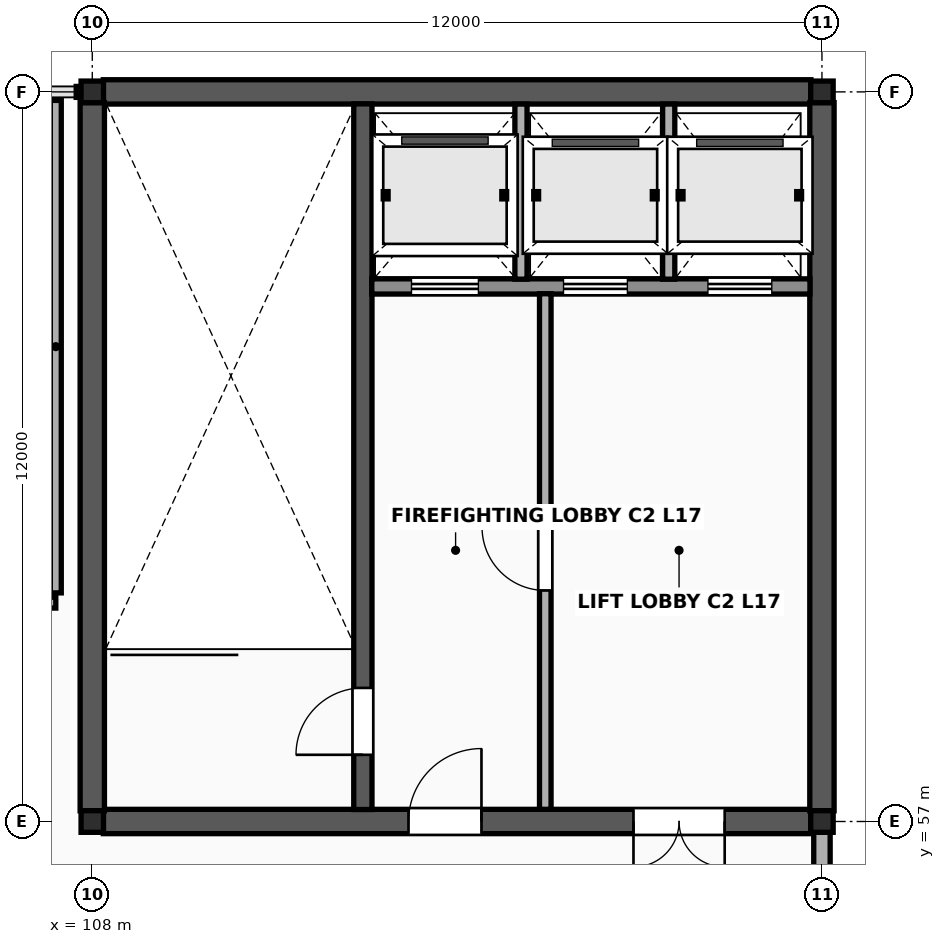
"""IFC4 building model, lengths in metres.
Left out: names, types, materials, properties, quantities, classifications, styles, units other than length and angle.
Written with IfcOpenShell. Run it as: python <this file> out.ifc"""

import sys

from ifc_helpers import new_model, si_unit, direction, frame, frame_2d, origin, origin_2d, place, context, subcontext, project, spatial, rectangle, i_section, extrude, element, fill, save


model = new_model("IFC4")
c1 = context("Model", 3, precision=1e-05, world=origin(), true_north=direction((0.0, 1.0)))
c2 = subcontext(c1, "Body", "Model", "MODEL_VIEW")
j1 = project(units=[si_unit("LENGTHUNIT", "METRE"), si_unit("PLANEANGLEUNIT", "RADIAN")], contexts=[c1])
p1 = place(None, origin())
s1 = spatial("IfcSite", under=j1, at=p1, CompositionType="ELEMENT")
p2 = place(p1, origin())
s2 = spatial("IfcBuilding", under=s1, at=p2, CompositionType="ELEMENT")
p3 = place(p2, frame((0.0, 0.0, 69.6)))
s3 = spatial("IfcBuildingStorey", under=s2, at=p3, CompositionType="ELEMENT", Elevation=69.6)
for number, where, z_axis, x_axis in (
    (1, (108.0, 57.0, 0.0), (0.0, 0.0, 1.0), (1.0, 0.0, 0.0)),
    (2, (108.0, 69.0, 0.0), (0.0, 0.0, 1.0), (1.0, 0.0, 0.0)),
    (3, (120.0, 57.0, 0.0), (0.0, 0.0, 1.0), (1.0, 0.0, 0.0)),
    (4, (120.0, 69.0, 0.0), (0.0, 0.0, 1.0), (1.0, 0.0, 0.0)),
):
    element("IfcColumn", number, at=place(p3, frame(where, z_axis=z_axis, x_axis=x_axis)), inside=s3, PredefinedType="COLUMN", context=c2, shape_type="SweptSolid", body=[
        extrude(i_section(OverallWidth=0.369, OverallDepth=0.356, WebThickness=0.011, FlangeThickness=0.018, FilletRadius=0.018, at=origin_2d()), origin(), (0.0, 0.0, 1.0), 4.6),
    ])
p4 = place(p3, frame((108.181, 57.0, 0.0), z_axis=(0.0, 0.0, 1.0), x_axis=(1.0, 0.0, 0.0)))
e5 = element("IfcWall", 5, at=p4, inside=s3, PredefinedType="SHEAR", context=c2, shape_type="SweptSolid", body=[
    extrude(rectangle(XDim=11.637, YDim=0.4, at=frame_2d((5.819, 0.0))), origin(), (0.0, 0.0, 1.0), 4.383),
])
p5 = place(p4, frame((5.019, 0.0, 0.0)))
e6 = element("IfcOpeningElement", 6, at=p5, cuts=e5, PredefinedType="OPENING", context=c2, shape_type="SweptSolid", body=[
    extrude(rectangle(XDim=1.2, YDim=2.2, at=frame_2d((0.6, 1.1))), frame((0.0, 0.215, 0.0), z_axis=(0.0, -1.0, 0.0), x_axis=(1.0, 0.0, 0.0)), (0.0, 0.0, 1.0), 0.43),
])
p6 = place(p4, frame((8.719, 0.0, 0.0)))
e7 = element("IfcOpeningElement", 7, at=p6, cuts=e5, PredefinedType="OPENING", context=c2, shape_type="SweptSolid", body=[
    extrude(rectangle(XDim=1.5, YDim=2.25, at=frame_2d((0.75, 1.125))), frame((0.0, 0.215, 0.0), z_axis=(0.0, -1.0, 0.0), x_axis=(1.0, 0.0, 0.0)), (0.0, 0.0, 1.0), 0.43),
])
p7 = place(p3, frame((108.181, 69.0, 0.0), z_axis=(0.0, 0.0, 1.0), x_axis=(1.0, 0.0, 0.0)))
e8 = element("IfcWall", 8, at=p7, inside=s3, PredefinedType="SHEAR", context=c2, shape_type="SweptSolid", body=[
    extrude(rectangle(XDim=11.637, YDim=0.4, at=frame_2d((5.819, 0.0))), origin(), (0.0, 0.0, 1.0), 4.383),
])
for number, where, z_axis, x_axis in (
    (9, (108.0, 57.175, 0.0), (0.0, 0.0, 1.0), (0.0, 1.0, 0.0)),
    (10, (120.0, 57.175, 0.0), (0.0, 0.0, 1.0), (0.0, 1.0, 0.0)),
):
    element("IfcWall", number, at=place(p3, frame(where, z_axis=z_axis, x_axis=x_axis)), inside=s3, PredefinedType="SHEAR", context=c2, shape_type="SweptSolid", body=[
        extrude(rectangle(XDim=11.65, YDim=0.4, at=frame_2d((5.825, 0.0))), origin(), (0.0, 0.0, 1.0), 4.383),
    ])
p8 = place(p3, frame((112.45, 57.197, 0.0), z_axis=(0.0, 0.0, 1.0), x_axis=(0.0, 1.0, 0.0)))
e11 = element("IfcWall", 11, at=p8, inside=s3, PredefinedType="SHEAR", context=c2, shape_type="SweptSolid", body=[
    extrude(rectangle(XDim=11.606, YDim=0.3, at=frame_2d((5.803, 0.0))), origin(), (0.0, 0.0, 1.0), 4.383),
])
p9 = place(p8, frame((0.9, 0.0, 0.0)))
e12 = element("IfcOpeningElement", 12, at=p9, cuts=e11, PredefinedType="OPENING", context=c2, shape_type="SweptSolid", body=[
    extrude(rectangle(XDim=1.1, YDim=2.2, at=frame_2d((0.55, 1.1))), frame((0.0, 0.165, 0.0), z_axis=(0.0, -1.0, 0.0), x_axis=(1.0, 0.0, 0.0)), (0.0, 0.0, 1.0), 0.33),
])
p10 = place(p3, frame((112.597, 65.8, 0.0), z_axis=(0.0, 0.0, 1.0), x_axis=(1.0, 0.0, 0.0)))
e13 = element("IfcWall", 13, at=p10, inside=s3, PredefinedType="SOLIDWALL", context=c2, shape_type="SweptSolid", body=[
    extrude(rectangle(XDim=7.206, YDim=0.25, at=frame_2d((3.603, 0.0))), origin(), (0.0, 0.0, 1.0), 4.383),
])
p11 = place(p10, frame((0.653, 0.0, 0.0)))
e14 = element("IfcOpeningElement", 14, at=p11, cuts=e13, PredefinedType="OPENING", context=c2, shape_type="SweptSolid", body=[
    extrude(rectangle(XDim=1.1, YDim=2.24, at=frame_2d((0.55, 1.12))), frame((0.0, 0.14, 0.0), z_axis=(0.0, -1.0, 0.0), x_axis=(1.0, 0.0, 0.0)), (0.0, 0.0, 1.0), 0.28),
])
p12 = place(p10, frame((3.153, 0.0, 0.0)))
e15 = element("IfcOpeningElement", 15, at=p12, cuts=e13, PredefinedType="OPENING", context=c2, shape_type="SweptSolid", body=[
    extrude(rectangle(XDim=1.05, YDim=2.2, at=frame_2d((0.525, 1.1))), frame((0.0, 0.14, 0.0), z_axis=(0.0, -1.0, 0.0), x_axis=(1.0, 0.0, 0.0)), (0.0, 0.0, 1.0), 0.28),
])
p13 = place(p10, frame((5.528, 0.0, 0.0)))
e16 = element("IfcOpeningElement", 16, at=p13, cuts=e13, PredefinedType="OPENING", context=c2, shape_type="SweptSolid", body=[
    extrude(rectangle(XDim=1.05, YDim=2.2, at=frame_2d((0.525, 1.1))), frame((0.0, 0.14, 0.0), z_axis=(0.0, -1.0, 0.0), x_axis=(1.0, 0.0, 0.0)), (0.0, 0.0, 1.0), 0.28),
])
for number, where, z_axis, x_axis in (
    (17, (115.05, 65.92, 0.0), (0.0, 0.0, 1.0), (0.0, 1.0, 0.0)),
    (18, (117.48, 65.92, 0.0), (0.0, 0.0, 1.0), (0.0, 1.0, 0.0)),
):
    element("IfcWall", number, at=place(p3, frame(where, z_axis=z_axis, x_axis=x_axis)), inside=s3, PredefinedType="SOLIDWALL", context=c2, shape_type="SweptSolid", body=[
        extrude(rectangle(XDim=2.88, YDim=0.2, at=frame_2d((1.44, 0.0))), origin(), (0.0, 0.0, 1.0), 4.373),
    ])
p14 = place(p3, frame((115.45, 57.2, 0.0), z_axis=(0.0, 0.0, 1.0), x_axis=(0.0, 1.0, 0.0)))
e19 = element("IfcWall", 19, at=p14, inside=s3, PredefinedType="SOLIDWALL", context=c2, shape_type="SweptSolid", body=[
    extrude(rectangle(XDim=8.48, YDim=0.19, at=frame_2d((4.24, 0.0))), origin(), (0.0, 0.0, 1.0), 4.373),
])
p15 = place(p14, frame((3.6, 0.0, 0.0)))
e20 = element("IfcOpeningElement", 20, at=p15, cuts=e19, PredefinedType="OPENING", context=c2, shape_type="SweptSolid", body=[
    extrude(rectangle(XDim=1.04, YDim=2.18, at=frame_2d((0.52, 1.09))), frame((0.0, 0.11, 0.0), z_axis=(0.0, -1.0, 0.0), x_axis=(1.0, 0.0, 0.0)), (0.0, 0.0, 1.0), 0.22),
])
p16 = place(p3, frame((120.0, 45.176, 0.0), z_axis=(0.0, 0.0, 1.0), x_axis=(0.0, 1.0, 0.0)))
e21 = element("IfcWall", 21, at=p16, inside=s3, PredefinedType="SOLIDWALL", context=c2, shape_type="SweptSolid", body=[
    extrude(rectangle(XDim=11.648, YDim=0.27, at=frame_2d((5.824, 0.0))), origin(), (0.0, 0.0, 1.0), 3.836),
])
p17 = place(p16, frame((4.399, 0.0, 1.4)))
e22 = element("IfcOpeningElement", 22, at=p17, cuts=e21, PredefinedType="OPENING", context=c2, shape_type="SweptSolid", body=[
    extrude(rectangle(XDim=2.85, YDim=0.88, at=frame_2d((1.425, 0.44))), frame((0.0, 0.15, 0.0), z_axis=(0.0, -1.0, 0.0), x_axis=(1.0, 0.0, 0.0)), (0.0, 0.0, 1.0), 0.3),
])
p18 = place(p3, frame((72.6, 60.6, 0.0), z_axis=(0.0, 0.0, 1.0), x_axis=(1.0, 0.0, 0.0)))
e23 = element("IfcWall", 23, at=p18, inside=s3, PredefinedType="SOLIDWALL", context=c2, shape_type="SweptSolid", body=[
    extrude(rectangle(XDim=34.8, YDim=0.18, at=frame_2d((17.4, 0.0))), origin(), (0.0, 0.0, 1.0), 2.88),
])
p19 = place(p18, frame((16.77, 0.0, 0.0)))
e24 = element("IfcOpeningElement", 24, at=p19, cuts=e23, PredefinedType="OPENING", context=c2, shape_type="SweptSolid", body=[
    extrude(rectangle(XDim=1.26, YDim=2.16, at=frame_2d((0.63, 1.08))), frame((0.0, 0.105, 0.0), z_axis=(0.0, -1.0, 0.0), x_axis=(1.0, 0.0, 0.0)), (0.0, 0.0, 1.0), 0.21),
])
p20 = place(p3, frame((107.4, 60.76, 0.0), z_axis=(0.0, 0.0, 1.0), x_axis=(0.0, 1.0, 0.0)))
e25 = element("IfcWall", 25, at=p20, inside=s3, PredefinedType="SOLIDWALL", context=c2, shape_type="SweptSolid", body=[
    extrude(rectangle(XDim=8.1, YDim=0.18, at=frame_2d((4.05, 0.0))), origin(), (0.0, 0.0, 1.0), 2.88),
])
p21 = place(p9, origin())
e26 = element("IfcDoor", 26, at=p21, inside=s3, OperationType="SINGLE_SWING_LEFT", PredefinedType="DOOR", context=c2, shape_type="SweptSolid", body=[
    extrude(rectangle(XDim=1.1, YDim=2.2, at=frame_2d((0.55, 1.1))), frame((0.0, 0.025, 0.0), z_axis=(0.0, -1.0, 0.0), x_axis=(1.0, 0.0, 0.0)), (0.0, 0.0, 1.0), 0.05),
])
fill(e12, e26)
p22 = place(p15, origin())
e27 = element("IfcDoor", 27, at=p22, inside=s3, OperationType="SINGLE_SWING_RIGHT", PredefinedType="DOOR", context=c2, shape_type="SweptSolid", body=[
    extrude(rectangle(XDim=1.04, YDim=2.18, at=frame_2d((0.52, 1.09))), frame((0.0, 0.025, 0.0), z_axis=(0.0, -1.0, 0.0), x_axis=(1.0, 0.0, 0.0)), (0.0, 0.0, 1.0), 0.05),
])
fill(e20, e27)
p23 = place(p5, origin())
e28 = element("IfcDoor", 28, at=p23, inside=s3, OperationType="SINGLE_SWING_RIGHT", PredefinedType="DOOR", context=c2, shape_type="SweptSolid", body=[
    extrude(rectangle(XDim=1.2, YDim=2.2, at=frame_2d((0.6, 1.1))), frame((0.0, 0.025, 0.0), z_axis=(0.0, -1.0, 0.0), x_axis=(1.0, 0.0, 0.0)), (0.0, 0.0, 1.0), 0.05),
])
fill(e6, e28)
p24 = place(p6, origin())
e29 = element("IfcDoor", 29, at=p24, inside=s3, OperationType="DOUBLE_DOOR_SINGLE_SWING", PredefinedType="DOOR", context=c2, shape_type="SweptSolid", body=[
    extrude(rectangle(XDim=1.5, YDim=2.25, at=frame_2d((0.75, 1.125))), frame((0.0, 0.025, 0.0), z_axis=(0.0, -1.0, 0.0), x_axis=(1.0, 0.0, 0.0)), (0.0, 0.0, 1.0), 0.05),
])
fill(e7, e29)
p25 = place(p11, origin())
e30 = element("IfcDoor", 30, at=p25, inside=s3, OperationType="SLIDING_TO_LEFT", PredefinedType="USERDEFINED", context=c2, shape_type="SweptSolid", body=[
    extrude(rectangle(XDim=1.1, YDim=2.24, at=frame_2d((0.55, 1.12))), frame((0.0, 0.025, 0.0), z_axis=(0.0, -1.0, 0.0), x_axis=(1.0, 0.0, 0.0)), (0.0, 0.0, 1.0), 0.05),
])
fill(e14, e30)
p26 = place(p12, origin())
e31 = element("IfcDoor", 31, at=p26, inside=s3, OperationType="SLIDING_TO_LEFT", PredefinedType="USERDEFINED", context=c2, shape_type="SweptSolid", body=[
    extrude(rectangle(XDim=1.05, YDim=2.2, at=frame_2d((0.525, 1.1))), frame((0.0, 0.025, 0.0), z_axis=(0.0, -1.0, 0.0), x_axis=(1.0, 0.0, 0.0)), (0.0, 0.0, 1.0), 0.05),
])
fill(e15, e31)
p27 = place(p13, origin())
e32 = element("IfcDoor", 32, at=p27, inside=s3, OperationType="SLIDING_TO_LEFT", PredefinedType="USERDEFINED", context=c2, shape_type="SweptSolid", body=[
    extrude(rectangle(XDim=1.05, YDim=2.2, at=frame_2d((0.525, 1.1))), frame((0.0, 0.025, 0.0), z_axis=(0.0, -1.0, 0.0), x_axis=(1.0, 0.0, 0.0)), (0.0, 0.0, 1.0), 0.05),
])
fill(e16, e32)
save(model, sys.argv[1])
